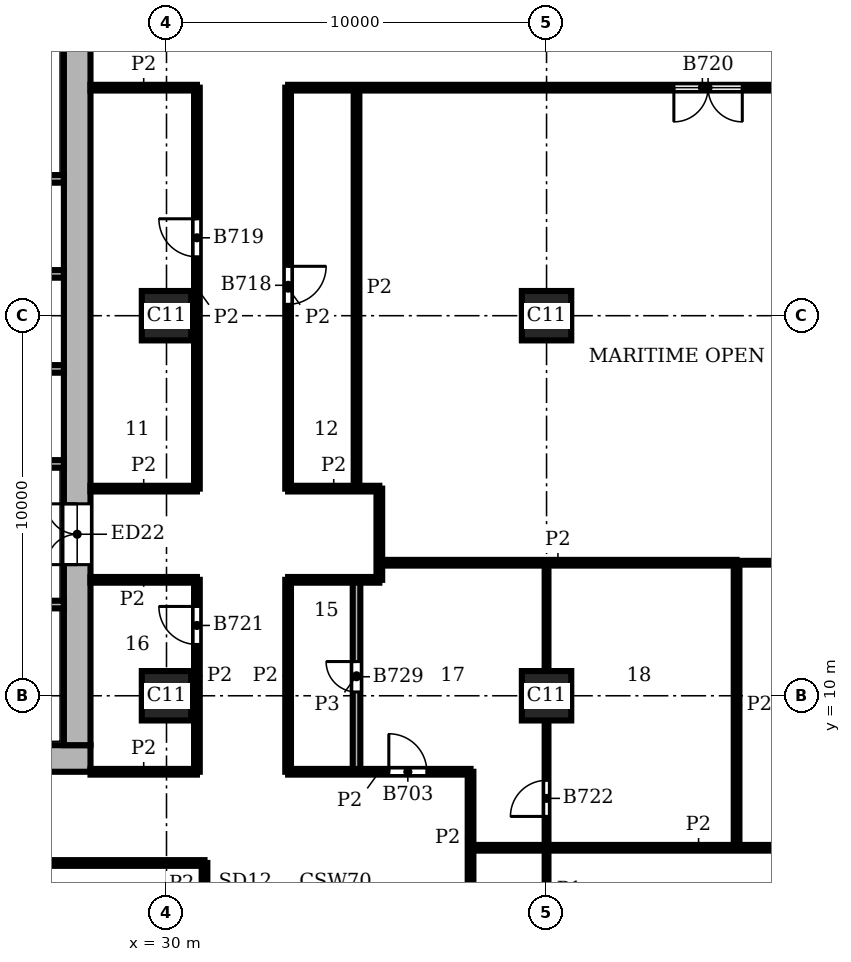
"""IFC4 building model, lengths in metres.
Left out: names, types, materials, properties, quantities, classifications, styles, units other than length and angle.
Written with IfcOpenShell. Run it as: python <this file> out.ifc"""

import sys

from ifc_helpers import new_model, si_unit, direction, frame, frame_2d, origin, origin_2d, place, context, subcontext, project, spatial, rectangle, extrude, element, fill, save


model = new_model("IFC4")
c1 = context("Model", 3, precision=1e-05, world=origin(), true_north=direction((0.0, 1.0)))
c2 = subcontext(c1, "Body", "Model", "MODEL_VIEW")
j1 = project(units=[si_unit("LENGTHUNIT", "METRE"), si_unit("PLANEANGLEUNIT", "RADIAN")], contexts=[c1])
p1 = place(None, origin())
s1 = spatial("IfcSite", under=j1, at=p1, CompositionType="ELEMENT")
p2 = place(p1, origin())
s2 = spatial("IfcBuilding", under=s1, at=p2, CompositionType="ELEMENT")
p3 = place(p2, frame((0.0, 0.0, 209.7)))
s3 = spatial("IfcBuildingStorey", under=s2, at=p3, CompositionType="ELEMENT", Elevation=209.7)
for number, where, z_axis, x_axis in (
    (1, (30.0, 10.0, 0.0), (0.0, 0.0, 1.0), (1.0, 0.0, 0.0)),
    (2, (30.0, 20.0, 0.0), (0.0, 0.0, 1.0), (1.0, 0.0, 0.0)),
    (3, (40.0, 10.0, 0.0), (0.0, 0.0, 1.0), (1.0, 0.0, 0.0)),
    (4, (40.0, 20.0, 0.0), (0.0, 0.0, 1.0), (1.0, 0.0, 0.0)),
):
    element("IfcColumn", number, at=place(p3, frame(where, z_axis=z_axis, x_axis=x_axis)), inside=s3, PredefinedType="COLUMN", context=c2, shape_type="SweptSolid", body=[
        extrude(rectangle(XDim=1.3, YDim=1.3, at=origin_2d()), origin(), (0.0, 0.0, 1.0), 3.9),
    ])
p4 = place(p3, frame((8.0, 8.35, 0.0), z_axis=(0.0, 0.0, 1.0), x_axis=(1.0, 0.0, 0.0)))
e5 = element("IfcWall", 5, at=p4, inside=s3, PredefinedType="SHEAR", context=c2, shape_type="SweptSolid", body=[
    extrude(rectangle(XDim=20.0, YDim=0.7, at=frame_2d((10.0, 0.0))), origin(), (0.0, 0.0, 1.0), 3.9),
])
p5 = place(p3, frame((27.65, 8.7, 0.0), z_axis=(0.0, 0.0, 1.0), x_axis=(0.0, 1.0, 0.0)))
e6 = element("IfcWall", 6, at=p5, inside=s3, PredefinedType="SHEAR", context=c2, shape_type="SweptSolid", body=[
    extrude(rectangle(XDim=18.6, YDim=0.7, at=frame_2d((9.3, 0.0))), origin(), (0.0, 0.0, 1.0), 3.9),
])
p6 = place(p5, frame((4.75, 0.0, 0.0)))
e7 = element("IfcOpeningElement", 7, at=p6, cuts=e6, PredefinedType="OPENING", context=c2, shape_type="SweptSolid", body=[
    extrude(rectangle(XDim=1.6, YDim=2.1, at=frame_2d((0.8, 1.05))), frame((0.0, 0.36, 0.0), z_axis=(0.0, -1.0, 0.0), x_axis=(1.0, 0.0, 0.0)), (0.0, 0.0, 1.0), 0.72),
])
p7 = place(p3, frame((13.8, 12.4, 0.0), z_axis=(0.0, 0.0, 1.0), x_axis=(1.0, 0.0, 0.0)))
e8 = element("IfcWall", 8, at=p7, inside=s3, PredefinedType="SHEAR", context=c2, shape_type="SweptSolid", body=[
    extrude(rectangle(XDim=13.5, YDim=0.2, at=frame_2d((6.75, 0.0))), origin(), (0.0, 0.0, 1.0), 3.58),
])
p8 = place(p7, frame((2.4, 0.0, 0.0)))
e9 = element("IfcOpeningElement", 9, at=p8, cuts=e8, PredefinedType="OPENING", context=c2, shape_type="SweptSolid", body=[
    extrude(rectangle(XDim=1.1, YDim=2.1, at=frame_2d((0.55, 1.05))), frame((0.0, 0.11, 0.0), z_axis=(0.0, -1.0, 0.0), x_axis=(1.0, 0.0, 0.0)), (0.0, 0.0, 1.0), 0.22),
])
p9 = place(p7, frame((4.9, 0.0, 0.0)))
e10 = element("IfcOpeningElement", 10, at=p9, cuts=e8, PredefinedType="OPENING", context=c2, shape_type="SweptSolid", body=[
    extrude(rectangle(XDim=1.1, YDim=2.1, at=frame_2d((0.55, 1.05))), frame((0.0, 0.11, 0.0), z_axis=(0.0, -1.0, 0.0), x_axis=(1.0, 0.0, 0.0)), (0.0, 0.0, 1.0), 0.22),
])
p10 = place(p7, frame((0.2, 0.0, 0.0)))
e11 = element("IfcOpeningElement", 11, at=p10, cuts=e8, PredefinedType="OPENING", context=c2, shape_type="SweptSolid", body=[
    extrude(rectangle(XDim=1.0, YDim=2.1, at=frame_2d((0.5, 1.05))), frame((0.0, 0.11, 0.0), z_axis=(0.0, -1.0, 0.0), x_axis=(1.0, 0.0, 0.0)), (0.0, 0.0, 1.0), 0.22),
])
for number, where, z_axis, x_axis in (
    (12, (24.3, 16.1, 0.0), (0.0, 0.0, 1.0), (1.0, 0.0, 0.0)),
    (13, (24.3, 18.6, 0.0), (0.0, 0.0, 1.0), (1.0, 0.0, 0.0)),
    (14, (24.3, 21.1, 0.0), (0.0, 0.0, 1.0), (1.0, 0.0, 0.0)),
):
    element("IfcWall", number, at=place(p3, frame(where, z_axis=z_axis, x_axis=x_axis)), inside=s3, PredefinedType="SHEAR", context=c2, shape_type="SweptSolid", body=[
        extrude(rectangle(XDim=3.0, YDim=0.2, at=frame_2d((1.5, 0.0))), origin(), (0.0, 0.0, 1.0), 3.58),
    ])
p11 = place(p3, frame((13.8, 23.6, 0.0), z_axis=(0.0, 0.0, 1.0), x_axis=(1.0, 0.0, 0.0)))
e15 = element("IfcWall", 15, at=p11, inside=s3, PredefinedType="SHEAR", context=c2, shape_type="SweptSolid", body=[
    extrude(rectangle(XDim=13.5, YDim=0.2, at=frame_2d((6.75, 0.0))), origin(), (0.0, 0.0, 1.0), 3.58),
])
p12 = place(p11, frame((2.4, 0.0, 0.0)))
e16 = element("IfcOpeningElement", 16, at=p12, cuts=e15, PredefinedType="OPENING", context=c2, shape_type="SweptSolid", body=[
    extrude(rectangle(XDim=1.1, YDim=2.1, at=frame_2d((0.55, 1.05))), frame((0.0, 0.11, 0.0), z_axis=(0.0, -1.0, 0.0), x_axis=(1.0, 0.0, 0.0)), (0.0, 0.0, 1.0), 0.22),
])
p13 = place(p11, frame((4.9, 0.0, 0.0)))
e17 = element("IfcOpeningElement", 17, at=p13, cuts=e15, PredefinedType="OPENING", context=c2, shape_type="SweptSolid", body=[
    extrude(rectangle(XDim=1.1, YDim=2.1, at=frame_2d((0.55, 1.05))), frame((0.0, 0.11, 0.0), z_axis=(0.0, -1.0, 0.0), x_axis=(1.0, 0.0, 0.0)), (0.0, 0.0, 1.0), 0.22),
])
p14 = place(p11, frame((0.2, 0.0, 0.0)))
e18 = element("IfcOpeningElement", 18, at=p14, cuts=e15, PredefinedType="OPENING", context=c2, shape_type="SweptSolid", body=[
    extrude(rectangle(XDim=1.0, YDim=2.1, at=frame_2d((0.5, 1.05))), frame((0.0, 0.11, 0.0), z_axis=(0.0, -1.0, 0.0), x_axis=(1.0, 0.0, 0.0)), (0.0, 0.0, 1.0), 0.22),
])
p15 = place(p3, frame((40.0, 0.45, 0.0), z_axis=(0.0, 0.0, 1.0), x_axis=(0.0, 1.0, 0.0)))
e19 = element("IfcWall", 19, at=p15, inside=s3, PredefinedType="PARTITIONING", context=c2, shape_type="SweptSolid", body=[
    extrude(rectangle(XDim=8.9, YDim=0.1, at=frame_2d((4.45, 0.0))), origin(), (0.0, 0.0, 1.0), 3.58),
])
p16 = place(p15, frame((6.375, 0.0, 0.0)))
e20 = element("IfcOpeningElement", 20, at=p16, cuts=e19, PredefinedType="OPENING", context=c2, shape_type="SweptSolid", body=[
    extrude(rectangle(XDim=0.95, YDim=2.1, at=frame_2d((0.475, 1.05))), frame((0.0, 0.06, 0.0), z_axis=(0.0, -1.0, 0.0), x_axis=(1.0, 0.0, 0.0)), (0.0, 0.0, 1.0), 0.12),
])
p17 = place(p15, frame((3.0, 0.0, 0.0)))
e21 = element("IfcOpeningElement", 21, at=p17, cuts=e19, PredefinedType="OPENING", context=c2, shape_type="SweptSolid", body=[
    extrude(rectangle(XDim=0.9, YDim=2.1, at=frame_2d((0.45, 1.05))), frame((0.0, 0.06, 0.0), z_axis=(0.0, -1.0, 0.0), x_axis=(1.0, 0.0, 0.0)), (0.0, 0.0, 1.0), 0.12),
])
p18 = place(p3, frame((40.0, 10.65, 0.0), z_axis=(0.0, 0.0, 1.0), x_axis=(0.0, 1.0, 0.0)))
e22 = element("IfcWall", 22, at=p18, inside=s3, PredefinedType="PARTITIONING", context=c2, shape_type="SweptSolid", body=[
    extrude(rectangle(XDim=2.85, YDim=0.1, at=frame_2d((1.425, 0.0))), origin(), (0.0, 0.0, 1.0), 3.58),
])
p19 = place(p3, frame((45.0, 13.5, 0.0), z_axis=(0.0, 0.0, 1.0), x_axis=(1.0, 0.0, 0.0)))
e23 = element("IfcWall", 23, at=p19, inside=s3, PredefinedType="PARTITIONING", context=c2, shape_type="SweptSolid", body=[
    extrude(rectangle(XDim=5.0, YDim=0.1, at=frame_2d((2.5, 0.0))), origin(), (0.0, 0.0, 1.0), 3.58),
])
p20 = place(p19, frame((2.35, 0.0, 0.0)))
e24 = element("IfcOpeningElement", 24, at=p20, cuts=e23, PredefinedType="OPENING", context=c2, shape_type="SweptSolid", body=[
    extrude(rectangle(XDim=0.9, YDim=2.1, at=frame_2d((0.45, 1.05))), frame((0.0, 0.06, 0.0), z_axis=(0.0, -1.0, 0.0), x_axis=(1.0, 0.0, 0.0)), (0.0, 0.0, 1.0), 0.12),
])
p21 = place(p3, frame((30.8, 8.0, 0.0), z_axis=(0.0, 0.0, 1.0), x_axis=(0.0, 1.0, 0.0)))
e25 = element("IfcWall", 25, at=p21, inside=s3, PredefinedType="PARTITIONING", context=c2, shape_type="SweptSolid", body=[
    extrude(rectangle(XDim=5.05, YDim=0.15, at=frame_2d((2.525, 0.0))), origin(), (0.0, 0.0, 1.0), 3.58),
])
p22 = place(p21, frame((3.35, 0.0, 0.0)))
e26 = element("IfcOpeningElement", 26, at=p22, cuts=e25, PredefinedType="OPENING", context=c2, shape_type="SweptSolid", body=[
    extrude(rectangle(XDim=1.0, YDim=2.1, at=frame_2d((0.5, 1.05))), frame((0.0, 0.085, 0.0), z_axis=(0.0, -1.0, 0.0), x_axis=(1.0, 0.0, 0.0)), (0.0, 0.0, 1.0), 0.17),
])
p23 = place(p3, frame((30.8, 15.45, 0.0), z_axis=(0.0, 0.0, 1.0), x_axis=(0.0, 1.0, 0.0)))
e27 = element("IfcWall", 27, at=p23, inside=s3, PredefinedType="PARTITIONING", context=c2, shape_type="SweptSolid", body=[
    extrude(rectangle(XDim=10.55, YDim=0.15, at=frame_2d((5.275, 0.0))), origin(), (0.0, 0.0, 1.0), 3.58),
])
p24 = place(p23, frame((6.1, 0.0, 0.0)))
e28 = element("IfcOpeningElement", 28, at=p24, cuts=e27, PredefinedType="OPENING", context=c2, shape_type="SweptSolid", body=[
    extrude(rectangle(XDim=1.0, YDim=2.1, at=frame_2d((0.5, 1.05))), frame((0.0, 0.085, 0.0), z_axis=(0.0, -1.0, 0.0), x_axis=(1.0, 0.0, 0.0)), (0.0, 0.0, 1.0), 0.17),
])
p25 = place(p3, frame((31.0, 4.5, 0.0), z_axis=(0.0, 0.0, 1.0), x_axis=(0.0, 1.0, 0.0)))
e29 = element("IfcWall", 29, at=p25, inside=s3, PredefinedType="PARTITIONING", context=c2, shape_type="SweptSolid", body=[
    extrude(rectangle(XDim=1.1, YDim=0.15, at=frame_2d((0.55, 0.0))), origin(), (0.0, 0.0, 1.0), 3.58),
])
p26 = place(p3, frame((33.2, 8.0, 0.0), z_axis=(0.0, 0.0, 1.0), x_axis=(0.0, 1.0, 0.0)))
e30 = element("IfcWall", 30, at=p26, inside=s3, PredefinedType="PARTITIONING", context=c2, shape_type="SweptSolid", body=[
    extrude(rectangle(XDim=5.05, YDim=0.15, at=frame_2d((2.525, 0.0))), origin(), (0.0, 0.0, 1.0), 3.58),
])
p27 = place(p3, frame((33.2, 15.45, 0.0), z_axis=(0.0, 0.0, 1.0), x_axis=(0.0, 1.0, 0.0)))
e31 = element("IfcWall", 31, at=p27, inside=s3, PredefinedType="PARTITIONING", context=c2, shape_type="SweptSolid", body=[
    extrude(rectangle(XDim=10.55, YDim=0.15, at=frame_2d((5.275, 0.0))), origin(), (0.0, 0.0, 1.0), 3.58),
])
p28 = place(p27, frame((4.85, 0.0, 0.0)))
e32 = element("IfcOpeningElement", 32, at=p28, cuts=e31, PredefinedType="OPENING", context=c2, shape_type="SweptSolid", body=[
    extrude(rectangle(XDim=1.0, YDim=2.1, at=frame_2d((0.5, 1.05))), frame((0.0, 0.085, 0.0), z_axis=(0.0, -1.0, 0.0), x_axis=(1.0, 0.0, 0.0)), (0.0, 0.0, 1.0), 0.17),
])
p29 = place(p3, frame((35.0, 15.45, 0.0), z_axis=(0.0, 0.0, 1.0), x_axis=(0.0, 1.0, 0.0)))
e33 = element("IfcWall", 33, at=p29, inside=s3, PredefinedType="PARTITIONING", context=c2, shape_type="SweptSolid", body=[
    extrude(rectangle(XDim=10.55, YDim=0.15, at=frame_2d((5.275, 0.0))), origin(), (0.0, 0.0, 1.0), 3.58),
])
p30 = place(p3, frame((35.6, 13.05, 0.0), z_axis=(0.0, 0.0, 1.0), x_axis=(0.0, 1.0, 0.0)))
e34 = element("IfcWall", 34, at=p30, inside=s3, PredefinedType="PARTITIONING", context=c2, shape_type="SweptSolid", body=[
    extrude(rectangle(XDim=2.4, YDim=0.15, at=frame_2d((1.2, 0.0))), origin(), (0.0, 0.0, 1.0), 3.58),
])
p31 = place(p3, frame((38.0, 4.5, 0.0), z_axis=(0.0, 0.0, 1.0), x_axis=(0.0, 1.0, 0.0)))
e35 = element("IfcWall", 35, at=p31, inside=s3, PredefinedType="PARTITIONING", context=c2, shape_type="SweptSolid", body=[
    extrude(rectangle(XDim=3.5, YDim=0.15, at=frame_2d((1.75, 0.0))), origin(), (0.0, 0.0, 1.0), 3.58),
])
p32 = place(p3, frame((45.0, 6.0, 0.0), z_axis=(0.0, 0.0, 1.0), x_axis=(0.0, 1.0, 0.0)))
e36 = element("IfcWall", 36, at=p32, inside=s3, PredefinedType="PARTITIONING", context=c2, shape_type="SweptSolid", body=[
    extrude(rectangle(XDim=7.5, YDim=0.15, at=frame_2d((3.75, 0.0))), origin(), (0.0, 0.0, 1.0), 3.58),
])
p33 = place(p3, frame((5.6, 5.6, 0.0), z_axis=(0.0, 0.0, 1.0), x_axis=(1.0, 0.0, 0.0)))
e37 = element("IfcWall", 37, at=p33, inside=s3, PredefinedType="PARTITIONING", context=c2, shape_type="SweptSolid", body=[
    extrude(rectangle(XDim=25.4, YDim=0.15, at=frame_2d((12.7, 0.0))), origin(), (0.0, 0.0, 1.0), 3.58),
])
p34 = place(p33, frame((5.35, 0.0, 0.0)))
e38 = element("IfcOpeningElement", 38, at=p34, cuts=e37, PredefinedType="OPENING", context=c2, shape_type="SweptSolid", body=[
    extrude(rectangle(XDim=1.0, YDim=2.1, at=frame_2d((0.5, 1.05))), frame((0.0, 0.085, 0.0), z_axis=(0.0, -1.0, 0.0), x_axis=(1.0, 0.0, 0.0)), (0.0, 0.0, 1.0), 0.17),
])
p35 = place(p33, frame((11.25, 0.0, 0.0)))
e39 = element("IfcOpeningElement", 39, at=p35, cuts=e37, PredefinedType="OPENING", context=c2, shape_type="SweptSolid", body=[
    extrude(rectangle(XDim=1.0, YDim=2.1, at=frame_2d((0.5, 1.05))), frame((0.0, 0.085, 0.0), z_axis=(0.0, -1.0, 0.0), x_axis=(1.0, 0.0, 0.0)), (0.0, 0.0, 1.0), 0.17),
])
p36 = place(p33, frame((18.75, 0.0, 0.0)))
e40 = element("IfcOpeningElement", 40, at=p36, cuts=e37, PredefinedType="OPENING", context=c2, shape_type="SweptSolid", body=[
    extrude(rectangle(XDim=1.0, YDim=2.1, at=frame_2d((0.5, 1.05))), frame((0.0, 0.085, 0.0), z_axis=(0.0, -1.0, 0.0), x_axis=(1.0, 0.0, 0.0)), (0.0, 0.0, 1.0), 0.17),
])
p37 = place(p3, frame((38.0, 6.0, 0.0), z_axis=(0.0, 0.0, 1.0), x_axis=(1.0, 0.0, 0.0)))
e41 = element("IfcWall", 41, at=p37, inside=s3, PredefinedType="PARTITIONING", context=c2, shape_type="SweptSolid", body=[
    extrude(rectangle(XDim=12.0, YDim=0.15, at=frame_2d((6.0, 0.0))), origin(), (0.0, 0.0, 1.0), 3.58),
])
p38 = place(p3, frame((28.0, 8.0, 0.0), z_axis=(0.0, 0.0, 1.0), x_axis=(1.0, 0.0, 0.0)))
e42 = element("IfcWall", 42, at=p38, inside=s3, PredefinedType="PARTITIONING", context=c2, shape_type="SweptSolid", body=[
    extrude(rectangle(XDim=2.8, YDim=0.15, at=frame_2d((1.4, 0.0))), origin(), (0.0, 0.0, 1.0), 3.58),
])
p39 = place(p3, frame((33.2, 8.0, 0.0), z_axis=(0.0, 0.0, 1.0), x_axis=(1.0, 0.0, 0.0)))
e43 = element("IfcWall", 43, at=p39, inside=s3, PredefinedType="PARTITIONING", context=c2, shape_type="SweptSolid", body=[
    extrude(rectangle(XDim=4.8, YDim=0.15, at=frame_2d((2.4, 0.0))), origin(), (0.0, 0.0, 1.0), 3.58),
])
p40 = place(p39, frame((2.65, 0.0, 0.0)))
e44 = element("IfcOpeningElement", 44, at=p40, cuts=e43, PredefinedType="OPENING", context=c2, shape_type="SweptSolid", body=[
    extrude(rectangle(XDim=1.0, YDim=2.1, at=frame_2d((0.5, 1.05))), frame((0.0, 0.085, 0.0), z_axis=(0.0, -1.0, 0.0), x_axis=(1.0, 0.0, 0.0)), (0.0, 0.0, 1.0), 0.17),
])
p41 = place(p3, frame((28.0, 13.05, 0.0), z_axis=(0.0, 0.0, 1.0), x_axis=(1.0, 0.0, 0.0)))
e45 = element("IfcWall", 45, at=p41, inside=s3, PredefinedType="PARTITIONING", context=c2, shape_type="SweptSolid", body=[
    extrude(rectangle(XDim=2.8, YDim=0.15, at=frame_2d((1.4, 0.0))), origin(), (0.0, 0.0, 1.0), 3.58),
])
p42 = place(p3, frame((33.2, 13.05, 0.0), z_axis=(0.0, 0.0, 1.0), x_axis=(1.0, 0.0, 0.0)))
e46 = element("IfcWall", 46, at=p42, inside=s3, PredefinedType="PARTITIONING", context=c2, shape_type="SweptSolid", body=[
    extrude(rectangle(XDim=2.4, YDim=0.15, at=frame_2d((1.2, 0.0))), origin(), (0.0, 0.0, 1.0), 3.58),
])
p43 = place(p3, frame((35.6, 13.5, 0.0), z_axis=(0.0, 0.0, 1.0), x_axis=(1.0, 0.0, 0.0)))
e47 = element("IfcWall", 47, at=p43, inside=s3, PredefinedType="PARTITIONING", context=c2, shape_type="SweptSolid", body=[
    extrude(rectangle(XDim=9.4, YDim=0.15, at=frame_2d((4.7, 0.0))), origin(), (0.0, 0.0, 1.0), 3.58),
])
p44 = place(p3, frame((28.0, 15.45, 0.0), z_axis=(0.0, 0.0, 1.0), x_axis=(1.0, 0.0, 0.0)))
e48 = element("IfcWall", 48, at=p44, inside=s3, PredefinedType="PARTITIONING", context=c2, shape_type="SweptSolid", body=[
    extrude(rectangle(XDim=2.8, YDim=0.15, at=frame_2d((1.4, 0.0))), origin(), (0.0, 0.0, 1.0), 3.58),
])
p45 = place(p3, frame((33.2, 15.45, 0.0), z_axis=(0.0, 0.0, 1.0), x_axis=(1.0, 0.0, 0.0)))
e49 = element("IfcWall", 49, at=p45, inside=s3, PredefinedType="PARTITIONING", context=c2, shape_type="SweptSolid", body=[
    extrude(rectangle(XDim=2.4, YDim=0.15, at=frame_2d((1.2, 0.0))), origin(), (0.0, 0.0, 1.0), 3.58),
])
p46 = place(p3, frame((28.0, 26.0, 0.0), z_axis=(0.0, 0.0, 1.0), x_axis=(1.0, 0.0, 0.0)))
e50 = element("IfcWall", 50, at=p46, inside=s3, PredefinedType="PARTITIONING", context=c2, shape_type="SweptSolid", body=[
    extrude(rectangle(XDim=2.8, YDim=0.15, at=frame_2d((1.4, 0.0))), origin(), (0.0, 0.0, 1.0), 3.58),
])
p47 = place(p3, frame((33.2, 26.0, 0.0), z_axis=(0.0, 0.0, 1.0), x_axis=(1.0, 0.0, 0.0)))
e51 = element("IfcWall", 51, at=p47, inside=s3, PredefinedType="PARTITIONING", context=c2, shape_type="SweptSolid", body=[
    extrude(rectangle(XDim=21.8, YDim=0.15, at=frame_2d((10.9, 0.0))), origin(), (0.0, 0.0, 1.0), 3.58),
])
p48 = place(p47, frame((10.15, 0.0, 0.0)))
e52 = element("IfcOpeningElement", 52, at=p48, cuts=e51, PredefinedType="OPENING", context=c2, shape_type="SweptSolid", body=[
    extrude(rectangle(XDim=1.8, YDim=2.1, at=frame_2d((0.9, 1.05))), frame((0.0, 0.085, 0.0), z_axis=(0.0, -1.0, 0.0), x_axis=(1.0, 0.0, 0.0)), (0.0, 0.0, 1.0), 0.17),
])
p49 = place(p3, frame((35.0, 8.0, 0.0), z_axis=(0.0, 0.0, 1.0), x_axis=(0.0, 1.0, 0.0)))
e53 = element("IfcWall", 53, at=p49, inside=s3, PredefinedType="PARTITIONING", context=c2, shape_type="SweptSolid", body=[
    extrude(rectangle(XDim=5.05, YDim=0.2, at=frame_2d((2.525, 0.0))), origin(), (0.0, 0.0, 1.0), 3.58),
])
p50 = place(p49, frame((2.1, 0.0, 0.0)))
e54 = element("IfcOpeningElement", 54, at=p50, cuts=e53, PredefinedType="OPENING", context=c2, shape_type="SweptSolid", body=[
    extrude(rectangle(XDim=0.8, YDim=2.1, at=frame_2d((0.4, 1.05))), frame((0.0, 0.11, 0.0), z_axis=(0.0, -1.0, 0.0), x_axis=(1.0, 0.0, 0.0)), (0.0, 0.0, 1.0), 0.22),
])
p51 = place(p6, origin())
e55 = element("IfcDoor", 55, at=p51, inside=s3, OperationType="DOUBLE_DOOR_SINGLE_SWING", PredefinedType="DOOR", context=c2, shape_type="SweptSolid", body=[
    extrude(rectangle(XDim=1.6, YDim=2.1, at=frame_2d((0.8, 1.05))), frame((0.0, 0.025, 0.0), z_axis=(0.0, -1.0, 0.0), x_axis=(1.0, 0.0, 0.0)), (0.0, 0.0, 1.0), 0.05),
])
fill(e7, e55)
p52 = place(p40, origin())
e56 = element("IfcDoor", 56, at=p52, inside=s3, OperationType="SINGLE_SWING_LEFT", PredefinedType="DOOR", context=c2, shape_type="SweptSolid", body=[
    extrude(rectangle(XDim=1.0, YDim=2.1, at=frame_2d((0.5, 1.05))), frame((0.0, 0.025, 0.0), z_axis=(0.0, -1.0, 0.0), x_axis=(1.0, 0.0, 0.0)), (0.0, 0.0, 1.0), 0.05),
])
fill(e44, e56)
p53 = place(p28, frame((1.0, 0.0, 0.0), z_axis=(0.0, 0.0, 1.0), x_axis=(-1.0, 0.0, 0.0)))
e57 = element("IfcDoor", 57, at=p53, inside=s3, OperationType="SINGLE_SWING_LEFT", PredefinedType="DOOR", context=c2, shape_type="SweptSolid", body=[
    extrude(rectangle(XDim=1.0, YDim=2.1, at=frame_2d((0.5, 1.05))), frame((0.0, 0.025, 0.0), z_axis=(0.0, -1.0, 0.0), x_axis=(1.0, 0.0, 0.0)), (0.0, 0.0, 1.0), 0.05),
])
fill(e32, e57)
p54 = place(p24, origin())
e58 = element("IfcDoor", 58, at=p54, inside=s3, OperationType="SINGLE_SWING_RIGHT", PredefinedType="DOOR", context=c2, shape_type="SweptSolid", body=[
    extrude(rectangle(XDim=1.0, YDim=2.1, at=frame_2d((0.5, 1.05))), frame((0.0, 0.025, 0.0), z_axis=(0.0, -1.0, 0.0), x_axis=(1.0, 0.0, 0.0)), (0.0, 0.0, 1.0), 0.05),
])
fill(e28, e58)
p55 = place(p48, frame((1.8, 0.0, 0.0), z_axis=(0.0, 0.0, 1.0), x_axis=(-1.0, 0.0, 0.0)))
e59 = element("IfcDoor", 59, at=p55, inside=s3, OperationType="DOUBLE_DOOR_SINGLE_SWING", PredefinedType="DOOR", context=c2, shape_type="SweptSolid", body=[
    extrude(rectangle(XDim=1.8, YDim=2.1, at=frame_2d((0.9, 1.05))), frame((0.0, 0.025, 0.0), z_axis=(0.0, -1.0, 0.0), x_axis=(1.0, 0.0, 0.0)), (0.0, 0.0, 1.0), 0.05),
])
fill(e52, e59)
p56 = place(p22, origin())
e60 = element("IfcDoor", 60, at=p56, inside=s3, OperationType="SINGLE_SWING_RIGHT", PredefinedType="DOOR", context=c2, shape_type="SweptSolid", body=[
    extrude(rectangle(XDim=1.0, YDim=2.1, at=frame_2d((0.5, 1.05))), frame((0.0, 0.025, 0.0), z_axis=(0.0, -1.0, 0.0), x_axis=(1.0, 0.0, 0.0)), (0.0, 0.0, 1.0), 0.05),
])
fill(e26, e60)
p57 = place(p16, origin())
e61 = element("IfcDoor", 61, at=p57, inside=s3, OperationType="SINGLE_SWING_LEFT", PredefinedType="DOOR", context=c2, shape_type="SweptSolid", body=[
    extrude(rectangle(XDim=0.95, YDim=2.1, at=frame_2d((0.475, 1.05))), frame((0.0, 0.025, 0.0), z_axis=(0.0, -1.0, 0.0), x_axis=(1.0, 0.0, 0.0)), (0.0, 0.0, 1.0), 0.05),
])
fill(e20, e61)
p58 = place(p50, origin())
e62 = element("IfcDoor", 62, at=p58, inside=s3, OperationType="SINGLE_SWING_RIGHT", PredefinedType="DOOR", context=c2, shape_type="SweptSolid", body=[
    extrude(rectangle(XDim=0.8, YDim=2.1, at=frame_2d((0.4, 1.05))), frame((0.0, 0.025, 0.0), z_axis=(0.0, -1.0, 0.0), x_axis=(1.0, 0.0, 0.0)), (0.0, 0.0, 1.0), 0.05),
])
fill(e54, e62)
save(model, sys.argv[1])
